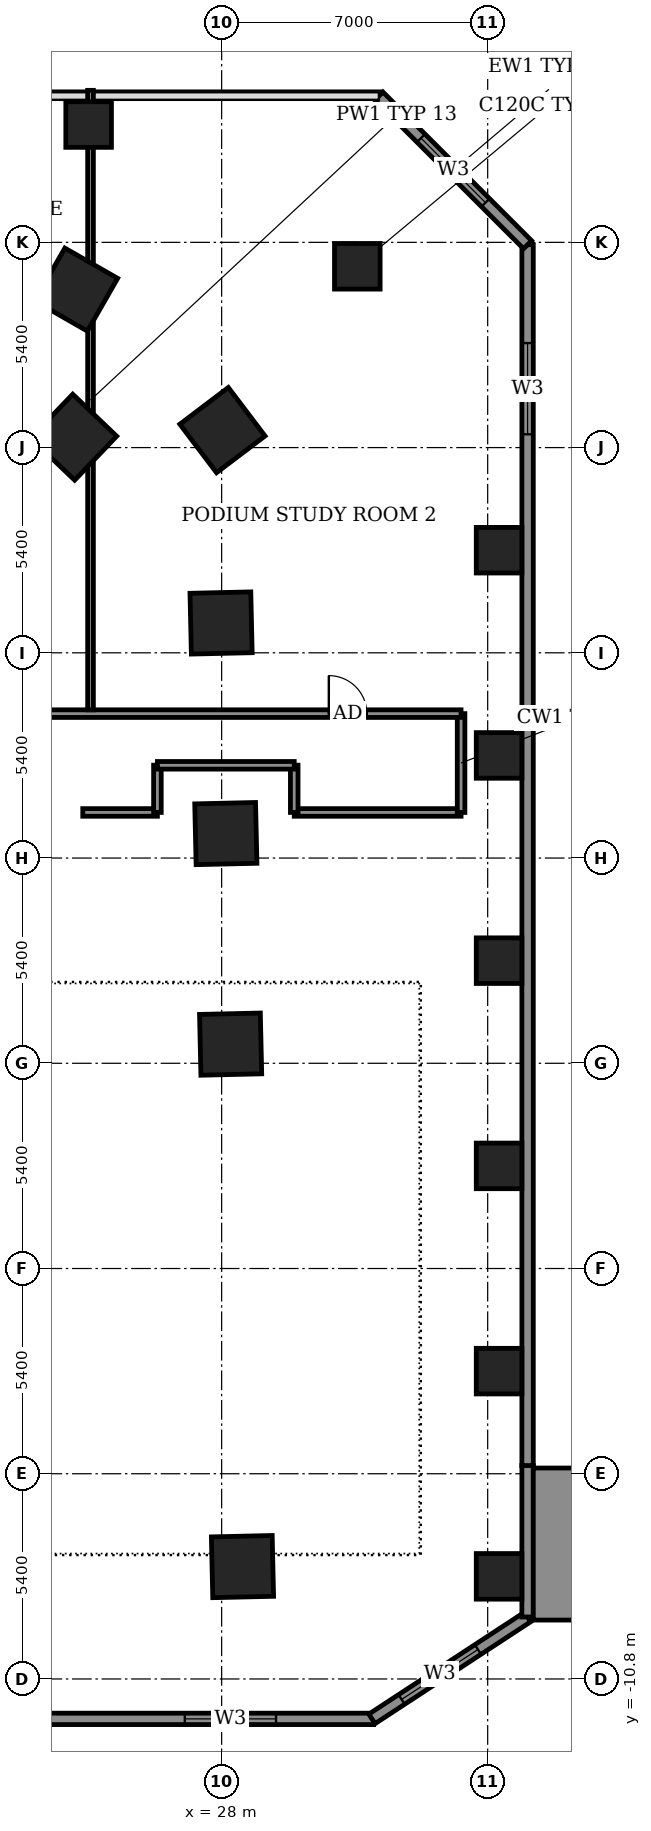
"""IFC4 building model, lengths in metres.
Left out: names, types, materials, properties, quantities, classifications, styles, units other than length and angle.
Written with IfcOpenShell. Run it as: python <this file> out.ifc"""

import sys

from ifc_helpers import new_model, si_unit, direction, frame, frame_2d, origin, origin_2d, place, context, subcontext, project, spatial, rectangle, extrude, element, fill, save


model = new_model("IFC4")
c1 = context("Model", 3, precision=1e-05, world=origin(), true_north=direction((0.0, 1.0)))
c2 = subcontext(c1, "Body", "Model", "MODEL_VIEW")
j1 = project(units=[si_unit("LENGTHUNIT", "METRE"), si_unit("PLANEANGLEUNIT", "RADIAN")], contexts=[c1])
p1 = place(None, origin())
s1 = spatial("IfcSite", under=j1, at=p1, CompositionType="ELEMENT")
p2 = place(p1, origin())
s2 = spatial("IfcBuilding", under=s1, at=p2, CompositionType="ELEMENT")
p3 = place(p2, frame((0.0, 0.0, 11.0)))
s3 = spatial("IfcBuildingStorey", under=s2, at=p3, CompositionType="ELEMENT", Elevation=11.0)
for number, where, z_axis, x_axis in (
    (1, (28.548, -7.843, -0.55), (0.0, 0.0, 1.0), (-0.023, 1.0, 0.0)),
    (2, (28.236, 5.904, -0.55), (0.0, 0.0, 1.0), (-0.023, 1.0, 0.0)),
    (3, (28.11, 11.444, -0.55), (0.0, 0.0, 1.0), (-0.023, 1.0, 0.0)),
    (4, (27.985, 16.985, -0.55), (0.0, 0.0, 1.0), (-0.023, 1.0, 0.0)),
    (5, (28.021, 22.06, -0.55), (0.0, 0.0, 1.0), (-0.604, 0.797, 0.0)),
    (6, (24.107, 21.874, -0.55), (0.0, 0.0, 1.0), (-0.723, 0.691, 0.0)),
    (7, (24.171, 25.757, -0.55), (0.0, 0.0, 1.0), (-0.868, 0.497, 0.0)),
):
    element("IfcColumn", number, at=place(p3, frame(where, z_axis=z_axis, x_axis=x_axis)), inside=s3, PredefinedType="COLUMN", context=c2, shape_type="SweptSolid", body=[
        extrude(rectangle(XDim=1.6, YDim=1.6, at=origin_2d()), origin(), (0.0, 0.0, 1.0), 5.0),
    ])
for number, where, z_axis, x_axis in (
    (8, (24.5, 30.1, -0.55), (0.0, 0.0, 1.0), (1.0, 0.0, 0.0)),
    (9, (35.3, -8.1, -0.55), (0.0, 0.0, 1.0), (1.0, 0.0, 0.0)),
    (10, (35.3, -2.7, -0.55), (0.0, 0.0, 1.0), (1.0, 0.0, 0.0)),
    (11, (35.3, 2.7, -0.55), (0.0, 0.0, 1.0), (1.0, 0.0, 0.0)),
    (12, (35.3, 8.1, -0.55), (0.0, 0.0, 1.0), (1.0, 0.0, 0.0)),
    (13, (35.3, 13.5, -0.55), (0.0, 0.0, 1.0), (1.0, 0.0, 0.0)),
    (14, (35.3, 18.9, -0.55), (0.0, 0.0, 1.0), (1.0, 0.0, 0.0)),
    (15, (31.57, 26.37, -0.55), (0.0, 0.0, 1.0), (1.0, 0.0, 0.0)),
):
    element("IfcColumn", number, at=place(p3, frame(where, z_axis=z_axis, x_axis=x_axis)), inside=s3, PredefinedType="COLUMN", context=c2, shape_type="SweptSolid", body=[
        extrude(rectangle(XDim=1.2, YDim=1.2, at=origin_2d()), origin(), (0.0, 0.0, 1.0), 5.0),
    ])
p4 = place(p3, frame((15.0, -11.85, 0.0), z_axis=(0.0, 0.0, 1.0), x_axis=(1.0, 0.0, 0.0)))
e16 = element("IfcWall", 16, at=p4, inside=s3, PredefinedType="SOLIDWALL", context=c2, shape_type="SweptSolid", body=[
    extrude(rectangle(XDim=17.0, YDim=0.3, at=frame_2d((8.5, 0.0))), origin(), (0.0, 0.0, 1.0), 4.45),
])
p5 = place(p4, frame((12.031, 0.0, 0.9)))
e17 = element("IfcOpeningElement", 17, at=p5, cuts=e16, PredefinedType="OPENING", context=c2, shape_type="SweptSolid", body=[
    extrude(rectangle(XDim=2.4, YDim=1.8, at=frame_2d((1.2, 0.9))), frame((0.0, 0.16, 0.0), z_axis=(0.0, -1.0, 0.0), x_axis=(1.0, 0.0, 0.0)), (0.0, 0.0, 1.0), 0.32),
])
p6 = place(p3, frame((31.955, -11.85, 0.0), z_axis=(0.0, 0.0, 1.0), x_axis=(0.836625876117, 0.54777471958, 0.0)))
e18 = element("IfcWall", 18, at=p6, inside=s3, PredefinedType="SOLIDWALL", context=c2, shape_type="SweptSolid", body=[
    extrude(rectangle(XDim=4.895, YDim=0.3, at=frame_2d((2.447, 0.0))), origin(), (0.0, 0.0, 1.0), 4.45),
])
p7 = place(p6, frame((0.933, 0.0, 0.9)))
e19 = element("IfcOpeningElement", 19, at=p7, cuts=e18, PredefinedType="OPENING", context=c2, shape_type="SweptSolid", body=[
    extrude(rectangle(XDim=2.4, YDim=1.8, at=frame_2d((1.2, 0.9))), frame((0.0, 0.16, 0.0), z_axis=(0.0, -1.0, 0.0), x_axis=(1.0, 0.0, 0.0)), (0.0, 0.0, 1.0), 0.32),
])
p8 = place(p3, frame((36.05, -9.169, 0.0), z_axis=(0.0, 0.0, 1.0), x_axis=(0.0, 1.0, 0.0)))
e20 = element("IfcWall", 20, at=p8, inside=s3, PredefinedType="SOLIDWALL", context=c2, shape_type="SweptSolid", body=[
    extrude(rectangle(XDim=3.984, YDim=0.3, at=frame_2d((1.992, 0.0))), origin(), (0.0, 0.0, 1.0), 4.45),
])
p9 = place(p3, frame((36.05, -5.185, 0.0), z_axis=(0.0, 0.0, 1.0), x_axis=(0.0, 1.0, 0.0)))
e21 = element("IfcWall", 21, at=p9, inside=s3, PredefinedType="SOLIDWALL", context=c2, shape_type="SweptSolid", body=[
    extrude(rectangle(XDim=32.123, YDim=0.3, at=frame_2d((16.062, 0.0))), origin(), (0.0, 0.0, 1.0), 4.45),
])
p10 = place(p9, frame((27.135, 0.0, 0.9)))
e22 = element("IfcOpeningElement", 22, at=p10, cuts=e21, PredefinedType="OPENING", context=c2, shape_type="SweptSolid", body=[
    extrude(rectangle(XDim=2.4, YDim=1.8, at=frame_2d((1.2, 0.9))), frame((0.0, 0.16, 0.0), z_axis=(0.0, -1.0, 0.0), x_axis=(1.0, 0.0, 0.0)), (0.0, 0.0, 1.0), 0.32),
])
p11 = place(p3, frame((36.05, 26.938, 0.0), z_axis=(0.0, 0.0, 1.0), x_axis=(-0.707106781187, 0.707106781187, 0.0)))
e23 = element("IfcWall", 23, at=p11, inside=s3, PredefinedType="SOLIDWALL", context=c2, shape_type="SweptSolid", body=[
    extrude(rectangle(XDim=5.532, YDim=0.3, at=frame_2d((2.766, 0.0))), origin(), (0.0, 0.0, 1.0), 4.45),
])
p12 = place(p11, frame((1.566, 0.0, 0.9)))
e24 = element("IfcOpeningElement", 24, at=p12, cuts=e23, PredefinedType="OPENING", context=c2, shape_type="SweptSolid", body=[
    extrude(rectangle(XDim=2.4, YDim=1.8, at=frame_2d((1.2, 0.9))), frame((0.0, 0.16, 0.0), z_axis=(0.0, -1.0, 0.0), x_axis=(1.0, 0.0, 0.0)), (0.0, 0.0, 1.0), 0.32),
])
p13 = place(p3, frame((37.45, -9.25, 0.0), z_axis=(0.0, 0.0, 1.0), x_axis=(0.0, 1.0, 0.0)))
e25 = element("IfcWall", 25, at=p13, inside=s3, PredefinedType="STANDARD", context=c2, shape_type="SweptSolid", body=[
    extrude(rectangle(XDim=4.0, YDim=2.5, at=frame_2d((2.0, 0.0))), origin(), (0.0, 0.0, 1.0), 5.0),
])
p14 = place(p3, frame((24.346, 12.0, 0.0), z_axis=(0.0, 0.0, 1.0), x_axis=(1.0, 0.0, 0.0)))
e26 = element("IfcWall", 26, at=p14, inside=s3, PredefinedType="PARTITIONING", context=c2, shape_type="SweptSolid", body=[
    extrude(rectangle(XDim=1.964, YDim=0.2, at=frame_2d((0.982, 0.0))), origin(), (0.0, 0.0, 1.0), 4.45),
])
p15 = place(p3, frame((26.31, 12.0, 0.0), z_axis=(0.0, 0.0, 1.0), x_axis=(0.0, 1.0, 0.0)))
e27 = element("IfcWall", 27, at=p15, inside=s3, PredefinedType="PARTITIONING", context=c2, shape_type="SweptSolid", body=[
    extrude(rectangle(XDim=1.244, YDim=0.2, at=frame_2d((0.622, 0.0))), origin(), (0.0, 0.0, 1.0), 4.45),
])
p16 = place(p3, frame((29.91, 12.0, 0.0), z_axis=(0.0, 0.0, 1.0), x_axis=(1.0, 0.0, 0.0)))
e28 = element("IfcWall", 28, at=p16, inside=s3, PredefinedType="PARTITIONING", context=c2, shape_type="SweptSolid", body=[
    extrude(rectangle(XDim=4.39, YDim=0.2, at=frame_2d((2.195, 0.0))), origin(), (0.0, 0.0, 1.0), 4.45),
])
p17 = place(p3, frame((29.91, 12.0, 0.0), z_axis=(0.0, 0.0, 1.0), x_axis=(0.0, 1.0, 0.0)))
e29 = element("IfcWall", 29, at=p17, inside=s3, PredefinedType="PARTITIONING", context=c2, shape_type="SweptSolid", body=[
    extrude(rectangle(XDim=1.244, YDim=0.2, at=frame_2d((0.622, 0.0))), origin(), (0.0, 0.0, 1.0), 4.45),
])
p18 = place(p3, frame((34.3, 12.0, 0.0), z_axis=(0.0, 0.0, 1.0), x_axis=(0.0, 1.0, 0.0)))
e30 = element("IfcWall", 30, at=p18, inside=s3, PredefinedType="PARTITIONING", context=c2, shape_type="SweptSolid", body=[
    extrude(rectangle(XDim=2.6, YDim=0.2, at=frame_2d((1.3, 0.0))), origin(), (0.0, 0.0, 1.0), 4.45),
])
p19 = place(p3, frame((26.31, 13.24, 0.0), z_axis=(0.0, 0.0, 1.0), x_axis=(1.0, 0.0, 0.0)))
e31 = element("IfcWall", 31, at=p19, inside=s3, PredefinedType="PARTITIONING", context=c2, shape_type="SweptSolid", body=[
    extrude(rectangle(XDim=3.6, YDim=0.2, at=frame_2d((1.8, 0.0))), origin(), (0.0, 0.0, 1.0), 4.45),
])
p20 = place(p3, frame((17.6, 14.6, 0.0), z_axis=(0.0, 0.0, 1.0), x_axis=(1.0, 0.0, 0.0)))
e32 = element("IfcWall", 32, at=p20, inside=s3, PredefinedType="PARTITIONING", context=c2, shape_type="SweptSolid", body=[
    extrude(rectangle(XDim=16.7, YDim=0.2, at=frame_2d((8.35, 0.0))), origin(), (0.0, 0.0, 1.0), 4.45),
])
p21 = place(p20, frame((13.22, 0.0, 0.0)))
e33 = element("IfcOpeningElement", 33, at=p21, cuts=e32, PredefinedType="OPENING", context=c2, shape_type="SweptSolid", body=[
    extrude(rectangle(XDim=1.0, YDim=2.1, at=frame_2d((0.5, 1.05))), frame((0.0, 0.11, 0.0), z_axis=(0.0, -1.0, 0.0), x_axis=(1.0, 0.0, 0.0)), (0.0, 0.0, 1.0), 0.22),
])
p22 = place(p20, frame((0.2, 0.0, 0.0)))
e34 = element("IfcOpeningElement", 34, at=p22, cuts=e32, PredefinedType="OPENING", context=c2, shape_type="SweptSolid", body=[
    extrude(rectangle(XDim=1.0, YDim=2.1, at=frame_2d((0.5, 1.05))), frame((0.0, 0.11, 0.0), z_axis=(0.0, -1.0, 0.0), x_axis=(1.0, 0.0, 0.0)), (0.0, 0.0, 1.0), 0.22),
])
p23 = place(p3, frame((24.55, 14.7, 0.0), z_axis=(0.0, 0.0, 1.0), x_axis=(0.0, 1.0, 0.0)))
e35 = element("IfcWall", 35, at=p23, inside=s3, PredefinedType="PARTITIONING", context=c2, shape_type="SweptSolid", body=[
    extrude(rectangle(XDim=16.3, YDim=0.15, at=frame_2d((8.15, 0.0))), origin(), (0.0, 0.0, 1.0), 0.94),
])
p24 = place(p5, origin())
e36 = element("IfcWindow", 36, at=p24, inside=s3, PartitioningType="DOUBLE_PANEL_VERTICAL", PredefinedType="WINDOW", context=c2, shape_type="SweptSolid", body=[
    extrude(rectangle(XDim=2.4, YDim=1.8, at=frame_2d((1.2, 0.9))), frame((0.0, 0.03, 0.0), z_axis=(0.0, -1.0, 0.0), x_axis=(1.0, 0.0, 0.0)), (0.0, 0.0, 1.0), 0.06),
])
fill(e17, e36)
p25 = place(p7, origin())
e37 = element("IfcWindow", 37, at=p25, inside=s3, PartitioningType="DOUBLE_PANEL_VERTICAL", PredefinedType="WINDOW", context=c2, shape_type="SweptSolid", body=[
    extrude(rectangle(XDim=2.4, YDim=1.8, at=frame_2d((1.2, 0.9))), frame((0.0, 0.03, 0.0), z_axis=(0.0, -1.0, 0.0), x_axis=(1.0, 0.0, 0.0)), (0.0, 0.0, 1.0), 0.06),
])
fill(e19, e37)
p26 = place(p10, origin())
e38 = element("IfcWindow", 38, at=p26, inside=s3, PartitioningType="DOUBLE_PANEL_VERTICAL", PredefinedType="WINDOW", context=c2, shape_type="SweptSolid", body=[
    extrude(rectangle(XDim=2.4, YDim=1.8, at=frame_2d((1.2, 0.9))), frame((0.0, 0.03, 0.0), z_axis=(0.0, -1.0, 0.0), x_axis=(1.0, 0.0, 0.0)), (0.0, 0.0, 1.0), 0.06),
])
fill(e22, e38)
p27 = place(p12, origin())
e39 = element("IfcWindow", 39, at=p27, inside=s3, PartitioningType="DOUBLE_PANEL_VERTICAL", PredefinedType="WINDOW", context=c2, shape_type="SweptSolid", body=[
    extrude(rectangle(XDim=2.4, YDim=1.8, at=frame_2d((1.2, 0.9))), frame((0.0, 0.03, 0.0), z_axis=(0.0, -1.0, 0.0), x_axis=(1.0, 0.0, 0.0)), (0.0, 0.0, 1.0), 0.06),
])
fill(e24, e39)
p28 = place(p21, origin())
e40 = element("IfcDoor", 40, at=p28, inside=s3, OperationType="SINGLE_SWING_LEFT", PredefinedType="DOOR", context=c2, shape_type="SweptSolid", body=[
    extrude(rectangle(XDim=1.0, YDim=2.1, at=frame_2d((0.5, 1.05))), frame((0.0, 0.025, 0.0), z_axis=(0.0, -1.0, 0.0), x_axis=(1.0, 0.0, 0.0)), (0.0, 0.0, 1.0), 0.05),
])
fill(e33, e40)
save(model, sys.argv[1])
